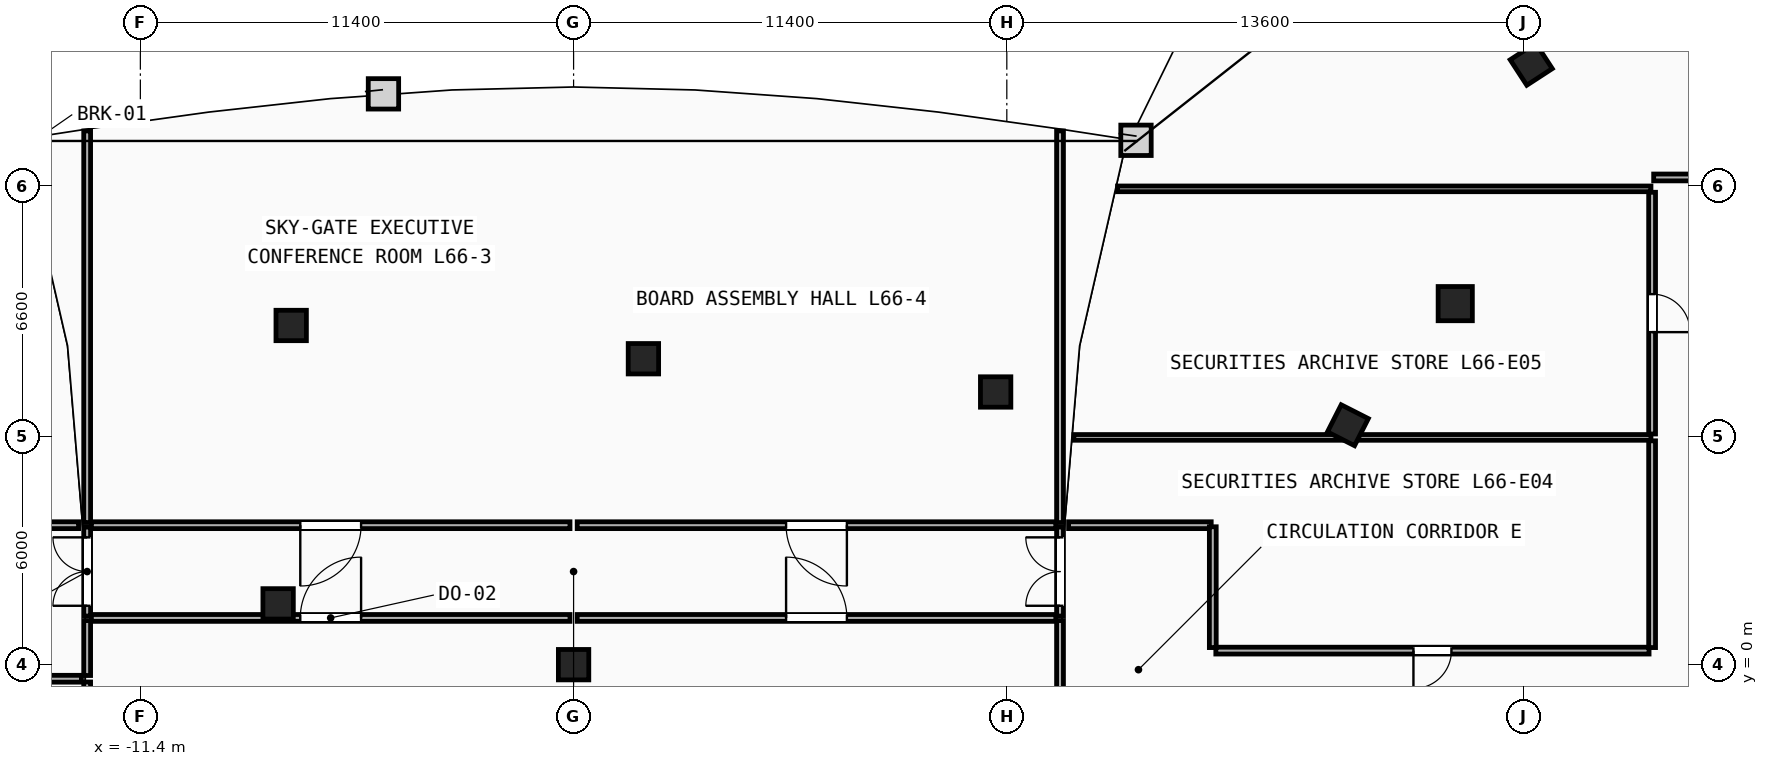
"""IFC4 building model, lengths in metres.
Left out: names, types, materials, properties, quantities, classifications, styles, units other than length and angle.
Written with IfcOpenShell. Run it as: python <this file> out.ifc"""

import sys

from ifc_helpers import new_model, si_unit, direction, frame, frame_2d, origin, origin_2d, place, context, subcontext, project, spatial, rectangle, extrude, element, fill, save


model = new_model("IFC4")
c1 = context("Model", 3, precision=1e-05, world=origin(), true_north=direction((0.0, 1.0)))
c2 = subcontext(c1, "Body", "Model", "MODEL_VIEW")
j1 = project(units=[si_unit("LENGTHUNIT", "METRE"), si_unit("PLANEANGLEUNIT", "RADIAN")], contexts=[c1])
p1 = place(None, origin())
s1 = spatial("IfcSite", under=j1, at=p1, CompositionType="ELEMENT")
p2 = place(p1, origin())
s2 = spatial("IfcBuilding", under=s1, at=p2, CompositionType="ELEMENT")
p3 = place(p2, frame((0.0, 0.0, 250.4)))
s3 = spatial("IfcBuildingStorey", under=s2, at=p3, CompositionType="ELEMENT", Elevation=250.4)
p4 = place(p3, frame((23.2, 9.5, 0.0), z_axis=(0.0, 0.0, 1.0), x_axis=(1.0, 0.0, 0.0)))
e1 = element("IfcColumn", 1, at=p4, inside=s3, PredefinedType="COLUMN", context=c2, shape_type="SweptSolid", body=[
    extrude(rectangle(XDim=0.9, YDim=0.9, at=origin_2d()), origin(), (0.0, 0.0, 1.0), 3.6),
])
for number, where, z_axis, x_axis in (
    (2, (25.2, 15.8, 0.0), (0.0, 0.0, 1.0), (-0.838, -0.546, 0.0)),
    (3, (20.375, 6.3, 0.0), (0.0, 0.0, 1.0), (-0.453, -0.892, 0.0)),
    (4, (-7.775, 1.6, 0.0), (0.0, 0.0, 1.0), (1.0, 0.0, 0.0)),
    (5, (0.0, 0.0, 0.0), (0.0, 0.0, 1.0), (1.0, 0.0, 0.0)),
    (6, (-7.431, 8.925, 0.0), (0.0, 0.0, 1.0), (1.0, 0.0, 0.0)),
    (7, (1.837, 8.05, 0.0), (0.0, 0.0, 1.0), (1.0, 0.0, 0.0)),
    (8, (11.106, 7.175, 0.0), (0.0, 0.0, 1.0), (1.0, 0.0, 0.0)),
):
    element("IfcColumn", number, at=place(p3, frame(where, z_axis=z_axis, x_axis=x_axis)), inside=s3, PredefinedType="COLUMN", context=c2, shape_type="SweptSolid", body=[
        extrude(rectangle(XDim=0.8, YDim=0.8, at=origin_2d()), origin(), (0.0, 0.0, 1.0), 3.6),
    ])
p5 = place(p3, frame((-28.3, -0.37, 0.0), z_axis=(0.0, 0.0, 1.0), x_axis=(1.0, 0.0, 0.0)))
e9 = element("IfcWall", 9, at=p5, inside=s3, PredefinedType="PARTITIONING", context=c2, shape_type="SweptSolid", body=[
    extrude(rectangle(XDim=15.349, YDim=0.18, at=frame_2d((7.675, 0.0))), origin(), (0.0, 0.0, 1.0), 3.34),
])
p6 = place(p5, frame((7.175, 0.0, 0.0)))
e10 = element("IfcOpeningElement", 10, at=p6, cuts=e9, PredefinedType="OPENING", context=c2, shape_type="SweptSolid", body=[
    extrude(rectangle(XDim=1.0, YDim=2.15, at=frame_2d((0.5, 1.075))), frame((0.0, 0.1, 0.0), z_axis=(0.0, -1.0, 0.0), x_axis=(1.0, 0.0, 0.0)), (0.0, 0.0, 1.0), 0.2),
])
p7 = place(p3, frame((-13.026, 3.67, 0.0), z_axis=(0.0, 0.0, 1.0), x_axis=(-1.0, 0.0, 0.0)))
e11 = element("IfcWall", 11, at=p7, inside=s3, PredefinedType="PARTITIONING", context=c2, shape_type="SweptSolid", body=[
    extrude(rectangle(XDim=3.753, YDim=0.18, at=frame_2d((1.876, 0.0))), origin(), (0.0, 0.0, 1.0), 3.34),
])
p8 = place(p3, frame((13.165, 5.98, 0.0), z_axis=(0.0, 0.0, 1.0), x_axis=(1.0, 0.0, 0.0)))
e12 = element("IfcWall", 12, at=p8, inside=s3, PredefinedType="PARTITIONING", context=c2, shape_type="SweptSolid", body=[
    extrude(rectangle(XDim=15.185, YDim=0.15, at=frame_2d((7.593, 0.0))), origin(), (0.0, 0.0, 1.0), 3.34),
])
p9 = place(p3, frame((14.314, 12.52, 0.0), z_axis=(0.0, 0.0, 1.0), x_axis=(1.0, 0.0, 0.0)))
e13 = element("IfcWall", 13, at=p9, inside=s3, PredefinedType="PARTITIONING", context=c2, shape_type="SweptSolid", body=[
    extrude(rectangle(XDim=14.036, YDim=0.15, at=frame_2d((7.018, 0.0))), origin(), (0.0, 0.0, 1.0), 3.34),
])
p10 = place(p3, frame((28.3, 0.37, 0.0), z_axis=(0.0, 0.0, 1.0), x_axis=(-1.0, 0.0, 0.0)))
e14 = element("IfcWall", 14, at=p10, inside=s3, PredefinedType="PARTITIONING", context=c2, shape_type="SweptSolid", body=[
    extrude(rectangle(XDim=11.4, YDim=0.18, at=frame_2d((5.7, 0.0))), origin(), (0.0, 0.0, 1.0), 3.34),
])
p11 = place(p10, frame((5.2, 0.0, 0.0)))
e15 = element("IfcOpeningElement", 15, at=p11, cuts=e14, PredefinedType="OPENING", context=c2, shape_type="SweptSolid", body=[
    extrude(rectangle(XDim=1.0, YDim=2.15, at=frame_2d((0.5, 1.075))), frame((0.0, 0.1, 0.0), z_axis=(0.0, -1.0, 0.0), x_axis=(1.0, 0.0, 0.0)), (0.0, 0.0, 1.0), 0.2),
])
p12 = place(p3, frame((28.38, 5.89, 0.0), z_axis=(0.0, 0.0, 1.0), x_axis=(0.0, -1.0, 0.0)))
e16 = element("IfcWall", 16, at=p12, inside=s3, PredefinedType="PARTITIONING", context=c2, shape_type="SweptSolid", body=[
    extrude(rectangle(XDim=5.44, YDim=0.18, at=frame_2d((2.72, 0.0))), origin(), (0.0, 0.0, 1.0), 3.34),
])
p13 = place(p3, frame((16.779, 3.67, 0.0), z_axis=(0.0, 0.0, 1.0), x_axis=(-1.0, 0.0, 0.0)))
e17 = element("IfcWall", 17, at=p13, inside=s3, PredefinedType="PARTITIONING", context=c2, shape_type="SweptSolid", body=[
    extrude(rectangle(XDim=3.753, YDim=0.18, at=frame_2d((1.876, 0.0))), origin(), (0.0, 0.0, 1.0), 3.34),
])
p14 = place(p3, frame((16.82, 0.45, 0.0), z_axis=(0.0, 0.0, 1.0), x_axis=(0.0, 1.0, 0.0)))
e18 = element("IfcWall", 18, at=p14, inside=s3, PredefinedType="PARTITIONING", context=c2, shape_type="SweptSolid", body=[
    extrude(rectangle(XDim=3.178, YDim=0.18, at=frame_2d((1.589, 0.0))), origin(), (0.0, 0.0, 1.0), 3.34),
])
p15 = place(p3, frame((28.38, 12.43, 0.0), z_axis=(0.0, 0.0, 1.0), x_axis=(0.0, -1.0, 0.0)))
e19 = element("IfcWall", 19, at=p15, inside=s3, PredefinedType="PARTITIONING", context=c2, shape_type="SweptSolid", body=[
    extrude(rectangle(XDim=6.36, YDim=0.18, at=frame_2d((3.18, 0.0))), origin(), (0.0, 0.0, 1.0), 3.34),
])
p16 = place(p15, frame((2.68, 0.0, 0.0)))
e20 = element("IfcOpeningElement", 20, at=p16, cuts=e19, PredefinedType="OPENING", context=c2, shape_type="SweptSolid", body=[
    extrude(rectangle(XDim=1.0, YDim=2.15, at=frame_2d((0.5, 1.075))), frame((0.0, 0.1, 0.0), z_axis=(0.0, -1.0, 0.0), x_axis=(1.0, 0.0, 0.0)), (0.0, 0.0, 1.0), 0.2),
])
p17 = place(p3, frame((30.779, 12.82, 0.0), z_axis=(0.0, 0.0, 1.0), x_axis=(-1.0, 0.0, 0.0)))
e21 = element("IfcWall", 21, at=p17, inside=s3, PredefinedType="PARTITIONING", context=c2, shape_type="SweptSolid", body=[
    extrude(rectangle(XDim=2.357, YDim=0.18, at=frame_2d((1.179, 0.0))), origin(), (0.0, 0.0, 1.0), 3.34),
])
p18 = place(p3, frame((-12.688, 1.23, 0.0), z_axis=(0.0, 0.0, 1.0), x_axis=(1.0, 0.0, 0.0)))
e22 = element("IfcWall", 22, at=p18, inside=s3, PredefinedType="PARTITIONING", context=c2, shape_type="SweptSolid", body=[
    extrude(rectangle(XDim=12.594, YDim=0.18, at=frame_2d((6.297, 0.0))), origin(), (0.0, 0.0, 1.0), 2.663),
])
p19 = place(p18, frame((5.497, 0.0, 0.0)))
e23 = element("IfcOpeningElement", 23, at=p19, cuts=e22, PredefinedType="OPENING", context=c2, shape_type="SweptSolid", body=[
    extrude(rectangle(XDim=1.6, YDim=2.2, at=frame_2d((0.8, 1.1))), frame((0.0, 0.1, 0.0), z_axis=(0.0, -1.0, 0.0), x_axis=(1.0, 0.0, 0.0)), (0.0, 0.0, 1.0), 0.2),
])
p20 = place(p3, frame((0.095, 1.23, 0.0), z_axis=(0.0, 0.0, 1.0), x_axis=(1.0, 0.0, 0.0)))
e24 = element("IfcWall", 24, at=p20, inside=s3, PredefinedType="PARTITIONING", context=c2, shape_type="SweptSolid", body=[
    extrude(rectangle(XDim=12.594, YDim=0.18, at=frame_2d((6.297, 0.0))), origin(), (0.0, 0.0, 1.0), 3.34),
])
p21 = place(p20, frame((5.497, 0.0, 0.0)))
e25 = element("IfcOpeningElement", 25, at=p21, cuts=e24, PredefinedType="OPENING", context=c2, shape_type="SweptSolid", body=[
    extrude(rectangle(XDim=1.6, YDim=2.2, at=frame_2d((0.8, 1.1))), frame((0.0, 0.1, 0.0), z_axis=(0.0, -1.0, 0.0), x_axis=(1.0, 0.0, 0.0)), (0.0, 0.0, 1.0), 0.2),
])
p22 = place(p3, frame((-0.095, 3.67, 0.0), z_axis=(0.0, 0.0, 1.0), x_axis=(-1.0, 0.0, 0.0)))
e26 = element("IfcWall", 26, at=p22, inside=s3, PredefinedType="PARTITIONING", context=c2, shape_type="SweptSolid", body=[
    extrude(rectangle(XDim=12.594, YDim=0.18, at=frame_2d((6.297, 0.0))), origin(), (0.0, 0.0, 1.0), 3.34),
])
p23 = place(p22, frame((5.497, 0.0, 0.0)))
e27 = element("IfcOpeningElement", 27, at=p23, cuts=e26, PredefinedType="OPENING", context=c2, shape_type="SweptSolid", body=[
    extrude(rectangle(XDim=1.6, YDim=2.2, at=frame_2d((0.8, 1.1))), frame((0.0, 0.1, 0.0), z_axis=(0.0, -1.0, 0.0), x_axis=(1.0, 0.0, 0.0)), (0.0, 0.0, 1.0), 0.2),
])
p24 = place(p3, frame((12.688, 3.67, 0.0), z_axis=(0.0, 0.0, 1.0), x_axis=(-1.0, 0.0, 0.0)))
e28 = element("IfcWall", 28, at=p24, inside=s3, PredefinedType="PARTITIONING", context=c2, shape_type="SweptSolid", body=[
    extrude(rectangle(XDim=12.594, YDim=0.18, at=frame_2d((6.297, 0.0))), origin(), (0.0, 0.0, 1.0), 3.34),
])
p25 = place(p24, frame((5.497, 0.0, 0.0)))
e29 = element("IfcOpeningElement", 29, at=p25, cuts=e28, PredefinedType="OPENING", context=c2, shape_type="SweptSolid", body=[
    extrude(rectangle(XDim=1.6, YDim=2.2, at=frame_2d((0.8, 1.1))), frame((0.0, 0.1, 0.0), z_axis=(0.0, -1.0, 0.0), x_axis=(1.0, 0.0, 0.0)), (0.0, 0.0, 1.0), 0.2),
])
p26 = place(p3, frame((-12.8, -14.044, 0.0), z_axis=(0.0, 0.0, 1.0), x_axis=(0.0, 1.0, 0.0)))
e30 = element("IfcWall", 30, at=p26, inside=s3, PredefinedType="PARTITIONING", context=c2, shape_type="SweptSolid", body=[
    extrude(rectangle(XDim=13.589, YDim=0.18, at=frame_2d((6.794, 0.0))), origin(), (0.0, 0.0, 1.0), 3.34),
])
p27 = place(p3, frame((-12.8, -0.285, 0.0), z_axis=(0.0, 0.0, 1.0), x_axis=(0.0, 1.0, 0.0)))
e31 = element("IfcWall", 31, at=p27, inside=s3, PredefinedType="PARTITIONING", context=c2, shape_type="SweptSolid", body=[
    extrude(rectangle(XDim=1.445, YDim=0.18, at=frame_2d((0.722, 0.0))), origin(), (0.0, 0.0, 1.0), 3.34),
])
p28 = place(p3, frame((-12.8, 3.74, 0.0), z_axis=(0.0, 0.0, 1.0), x_axis=(0.0, 1.0, 0.0)))
e32 = element("IfcWall", 32, at=p28, inside=s3, PredefinedType="PARTITIONING", context=c2, shape_type="SweptSolid", body=[
    extrude(rectangle(XDim=10.304, YDim=0.18, at=frame_2d((5.152, 0.0))), origin(), (0.0, 0.0, 1.0), 3.34),
])
p29 = place(p3, frame((-12.8, 1.28, 0.0), z_axis=(0.0, 0.0, 1.0), x_axis=(0.0, 1.0, 0.0)))
e33 = element("IfcWall", 33, at=p29, inside=s3, PredefinedType="PARTITIONING", context=c2, shape_type="SweptSolid", body=[
    extrude(rectangle(XDim=2.34, YDim=0.18, at=frame_2d((1.17, 0.0))), origin(), (0.0, 0.0, 1.0), 3.34),
])
p30 = place(p29, frame((0.27, 0.0, 0.0)))
e34 = element("IfcOpeningElement", 34, at=p30, cuts=e33, PredefinedType="OPENING", context=c2, shape_type="SweptSolid", body=[
    extrude(rectangle(XDim=1.8, YDim=2.25, at=frame_2d((0.9, 1.125))), frame((0.0, 0.1, 0.0), z_axis=(0.0, -1.0, 0.0), x_axis=(1.0, 0.0, 0.0)), (0.0, 0.0, 1.0), 0.2),
])
p31 = place(p3, frame((12.8, -14.044, 0.0), z_axis=(0.0, 0.0, 1.0), x_axis=(0.0, 1.0, 0.0)))
e35 = element("IfcWall", 35, at=p31, inside=s3, PredefinedType="PARTITIONING", context=c2, shape_type="SweptSolid", body=[
    extrude(rectangle(XDim=15.204, YDim=0.18, at=frame_2d((7.602, 0.0))), origin(), (0.0, 0.0, 1.0), 3.34),
])
p32 = place(p3, frame((12.8, 3.74, 0.0), z_axis=(0.0, 0.0, 1.0), x_axis=(0.0, 1.0, 0.0)))
e36 = element("IfcWall", 36, at=p32, inside=s3, PredefinedType="PARTITIONING", context=c2, shape_type="SweptSolid", body=[
    extrude(rectangle(XDim=10.304, YDim=0.18, at=frame_2d((5.152, 0.0))), origin(), (0.0, 0.0, 1.0), 3.34),
])
p33 = place(p3, frame((12.8, 1.28, 0.0), z_axis=(0.0, 0.0, 1.0), x_axis=(0.0, 1.0, 0.0)))
e37 = element("IfcWall", 37, at=p33, inside=s3, PredefinedType="PARTITIONING", context=c2, shape_type="SweptSolid", body=[
    extrude(rectangle(XDim=2.34, YDim=0.18, at=frame_2d((1.17, 0.0))), origin(), (0.0, 0.0, 1.0), 3.34),
])
p34 = place(p33, frame((0.27, 0.0, 0.0)))
e38 = element("IfcOpeningElement", 38, at=p34, cuts=e37, PredefinedType="OPENING", context=c2, shape_type="SweptSolid", body=[
    extrude(rectangle(XDim=1.8, YDim=2.25, at=frame_2d((0.9, 1.125))), frame((0.0, 0.1, 0.0), z_axis=(0.0, -1.0, 0.0), x_axis=(1.0, 0.0, 0.0)), (0.0, 0.0, 1.0), 0.2),
])
p35 = place(p19, origin())
e39 = element("IfcDoor", 39, at=p35, inside=s3, OperationType="SINGLE_SWING_RIGHT", PredefinedType="DOOR", context=c2, shape_type="SweptSolid", body=[
    extrude(rectangle(XDim=1.6, YDim=2.2, at=frame_2d((0.8, 1.1))), frame((0.0, 0.025, 0.0), z_axis=(0.0, -1.0, 0.0), x_axis=(1.0, 0.0, 0.0)), (0.0, 0.0, 1.0), 0.05),
])
fill(e23, e39)
p36 = place(p21, origin())
e40 = element("IfcDoor", 40, at=p36, inside=s3, OperationType="SINGLE_SWING_LEFT", PredefinedType="DOOR", context=c2, shape_type="SweptSolid", body=[
    extrude(rectangle(XDim=1.6, YDim=2.2, at=frame_2d((0.8, 1.1))), frame((0.0, 0.025, 0.0), z_axis=(0.0, -1.0, 0.0), x_axis=(1.0, 0.0, 0.0)), (0.0, 0.0, 1.0), 0.05),
])
fill(e25, e40)
p37 = place(p23, origin())
e41 = element("IfcDoor", 41, at=p37, inside=s3, OperationType="SINGLE_SWING_RIGHT", PredefinedType="DOOR", context=c2, shape_type="SweptSolid", body=[
    extrude(rectangle(XDim=1.6, YDim=2.2, at=frame_2d((0.8, 1.1))), frame((0.0, 0.025, 0.0), z_axis=(0.0, -1.0, 0.0), x_axis=(1.0, 0.0, 0.0)), (0.0, 0.0, 1.0), 0.05),
])
fill(e27, e41)
p38 = place(p25, origin())
e42 = element("IfcDoor", 42, at=p38, inside=s3, OperationType="SINGLE_SWING_LEFT", PredefinedType="DOOR", context=c2, shape_type="SweptSolid", body=[
    extrude(rectangle(XDim=1.6, YDim=2.2, at=frame_2d((0.8, 1.1))), frame((0.0, 0.025, 0.0), z_axis=(0.0, -1.0, 0.0), x_axis=(1.0, 0.0, 0.0)), (0.0, 0.0, 1.0), 0.05),
])
fill(e29, e42)
p39 = place(p11, origin())
e43 = element("IfcDoor", 43, at=p39, inside=s3, OperationType="SINGLE_SWING_RIGHT", PredefinedType="DOOR", context=c2, shape_type="SweptSolid", body=[
    extrude(rectangle(XDim=1.0, YDim=2.15, at=frame_2d((0.5, 1.075))), frame((0.0, 0.025, 0.0), z_axis=(0.0, -1.0, 0.0), x_axis=(1.0, 0.0, 0.0)), (0.0, 0.0, 1.0), 0.05),
])
fill(e15, e43)
p40 = place(p16, origin())
e44 = element("IfcDoor", 44, at=p40, inside=s3, OperationType="SINGLE_SWING_RIGHT", PredefinedType="DOOR", context=c2, shape_type="SweptSolid", body=[
    extrude(rectangle(XDim=1.0, YDim=2.15, at=frame_2d((0.5, 1.075))), frame((0.0, 0.025, 0.0), z_axis=(0.0, -1.0, 0.0), x_axis=(1.0, 0.0, 0.0)), (0.0, 0.0, 1.0), 0.05),
])
fill(e20, e44)
p41 = place(p30, origin())
e45 = element("IfcDoor", 45, at=p41, inside=s3, OperationType="DOUBLE_DOOR_SINGLE_SWING", PredefinedType="DOOR", context=c2, shape_type="SweptSolid", body=[
    extrude(rectangle(XDim=1.8, YDim=2.25, at=frame_2d((0.9, 1.125))), frame((0.0, 0.025, 0.0), z_axis=(0.0, -1.0, 0.0), x_axis=(1.0, 0.0, 0.0)), (0.0, 0.0, 1.0), 0.05),
])
fill(e34, e45)
p42 = place(p34, origin())
e46 = element("IfcDoor", 46, at=p42, inside=s3, OperationType="DOUBLE_DOOR_SINGLE_SWING", PredefinedType="DOOR", context=c2, shape_type="SweptSolid", body=[
    extrude(rectangle(XDim=1.8, YDim=2.25, at=frame_2d((0.9, 1.125))), frame((0.0, 0.025, 0.0), z_axis=(0.0, -1.0, 0.0), x_axis=(1.0, 0.0, 0.0)), (0.0, 0.0, 1.0), 0.05),
])
fill(e38, e46)
save(model, sys.argv[1])
